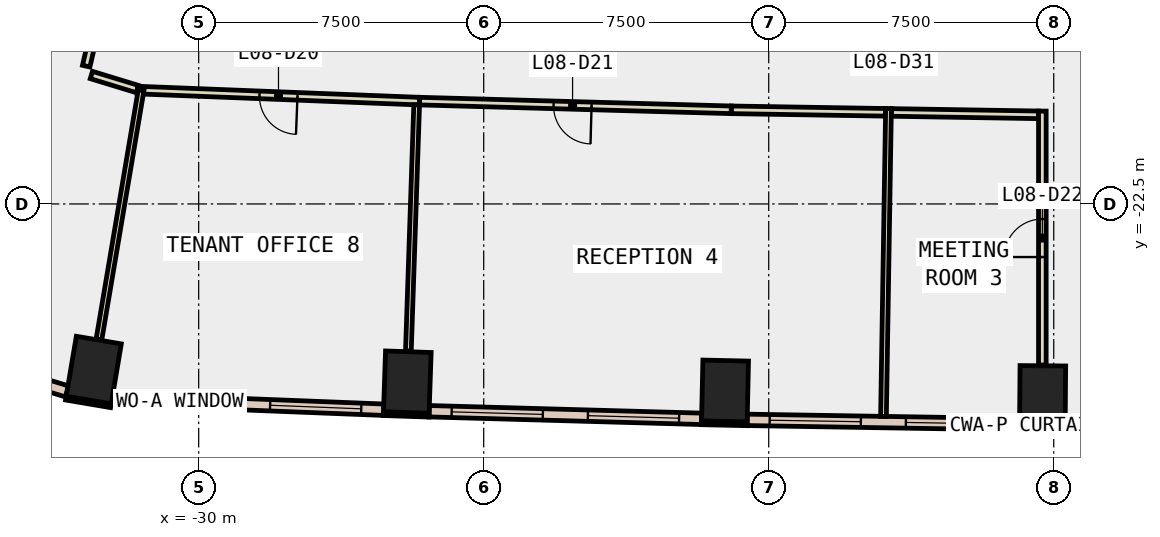
"""IFC4 building model, lengths in metres.
Left out: names, types, materials, properties, quantities, classifications, styles, units other than length and angle.
Written with IfcOpenShell. Run it as: python <this file> out.ifc"""

import sys

from ifc_helpers import new_model, si_unit, direction, frame, frame_2d, origin, origin_2d, place, context, subcontext, project, spatial, rectangle, extrude, element, fill, save


model = new_model("IFC4")
c1 = context("Model", 3, precision=1e-05, world=origin(), true_north=direction((0.0, 1.0)))
c2 = subcontext(c1, "Body", "Model", "MODEL_VIEW")
j1 = project(units=[si_unit("LENGTHUNIT", "METRE"), si_unit("PLANEANGLEUNIT", "RADIAN")], contexts=[c1])
p1 = place(None, origin())
s1 = spatial("IfcSite", under=j1, at=p1, CompositionType="ELEMENT")
p2 = place(p1, origin())
s2 = spatial("IfcBuilding", under=s1, at=p2, CompositionType="ELEMENT")
p3 = place(p2, frame((0.0, 0.0, 43.4)))
s3 = spatial("IfcBuildingStorey", under=s2, at=p3, CompositionType="ELEMENT", Elevation=43.4)
for number, where, z_axis, x_axis in (
    (1, (-32.761, -26.871, -0.4), (0.0, 0.0, 1.0), (-0.986, 0.167, 0.0)),
    (2, (-24.51, -27.188, -0.4), (0.0, 0.0, 1.0), (-0.999, 0.034, 0.0)),
    (3, (-16.15, -27.421, -0.4), (0.0, 0.0, 1.0), (-1.0, 0.022, 0.0)),
    (4, (-7.793, -27.558, -0.4), (0.0, 0.0, 1.0), (-1.0, 0.008, 0.0)),
):
    element("IfcColumn", number, at=place(p3, frame(where, z_axis=z_axis, x_axis=x_axis)), inside=s3, PredefinedType="COLUMN", context=c2, shape_type="SweptSolid", body=[
        extrude(rectangle(XDim=1.2, YDim=1.6, at=origin_2d()), origin(), (0.0, 0.0, 1.0), 4.2),
    ])
for number, where, z_axis, x_axis in (
    (5, (-33.494, -27.609, 0.0), (0.0, 0.0, 1.0), (0.986, -0.167, 0.0)),
    (6, (-25.138, -28.017, 0.0), (0.0, 0.0, 1.0), (0.999, -0.033, 0.0)),
):
    element("IfcWall", number, at=place(p3, frame(where, z_axis=z_axis, x_axis=x_axis)), inside=s3, PredefinedType="STANDARD", context=c2, shape_type="SweptSolid", body=[
        extrude(rectangle(XDim=1.2, YDim=0.1, at=frame_2d((0.6, 0.0))), origin(), (0.0, 0.0, 1.0), 3.8),
    ])
p4 = place(p3, frame((-16.769, -28.258, 0.0), z_axis=(0.0, 0.0, 1.0), x_axis=(0.99976752127, -0.021561618973, 0.0)))
e7 = element("IfcWall", 7, at=p4, inside=s3, PredefinedType="STANDARD", context=c2, shape_type="SweptSolid", body=[
    extrude(rectangle(XDim=1.2, YDim=0.1, at=frame_2d((0.6, 0.0))), origin(), (0.0, 0.0, 1.0), 3.8),
])
p5 = place(p3, frame((-8.4, -28.403, 0.0), z_axis=(0.0, 0.0, 1.0), x_axis=(0.999965208912, -0.008341520563, 0.0)))
e8 = element("IfcWall", 8, at=p5, inside=s3, PredefinedType="STANDARD", context=c2, shape_type="SweptSolid", body=[
    extrude(rectangle(XDim=1.2, YDim=0.1, at=frame_2d((0.6, 0.0))), origin(), (0.0, 0.0, 1.0), 3.8),
])
p6 = place(p3, frame((-32.282, -27.633, 0.0), z_axis=(0.0, 0.0, 1.0), x_axis=(0.999228146648, -0.039282450878, 0.0)))
e9 = element("IfcWall", 9, at=p6, inside=s3, PredefinedType="STANDARD", context=c2, shape_type="SweptSolid", body=[
    extrude(rectangle(XDim=7.154, YDim=0.3, at=frame_2d((3.577, 0.0))), origin(), (0.0, 0.0, 1.0), 3.8),
])
p7 = place(p6, frame((0.588, 0.0, 0.9)))
e10 = element("IfcOpeningElement", 10, at=p7, cuts=e9, PredefinedType="OPENING", context=c2, shape_type="SweptSolid", body=[
    extrude(rectangle(XDim=2.4, YDim=2.6, at=frame_2d((1.2, 1.3))), frame((0.0, 0.16, 0.0), z_axis=(0.0, -1.0, 0.0), x_axis=(1.0, 0.0, 0.0)), (0.0, 0.0, 1.0), 0.32),
])
p8 = place(p6, frame((4.165, 0.0, 0.9)))
e11 = element("IfcOpeningElement", 11, at=p8, cuts=e9, PredefinedType="OPENING", context=c2, shape_type="SweptSolid", body=[
    extrude(rectangle(XDim=2.4, YDim=2.6, at=frame_2d((1.2, 1.3))), frame((0.0, 0.16, 0.0), z_axis=(0.0, -1.0, 0.0), x_axis=(1.0, 0.0, 0.0)), (0.0, 0.0, 1.0), 0.32),
])
p9 = place(p3, frame((-23.936, -27.954, 0.0), z_axis=(0.0, 0.0, 1.0), x_axis=(0.999611502654, -0.02787191709, 0.0)))
e12 = element("IfcWall", 12, at=p9, inside=s3, PredefinedType="STANDARD", context=c2, shape_type="SweptSolid", body=[
    extrude(rectangle(XDim=7.174, YDim=0.3, at=frame_2d((3.587, 0.0))), origin(), (0.0, 0.0, 1.0), 3.8),
])
p10 = place(p9, frame((0.593, 0.0, 0.9)))
e13 = element("IfcOpeningElement", 13, at=p10, cuts=e12, PredefinedType="OPENING", context=c2, shape_type="SweptSolid", body=[
    extrude(rectangle(XDim=2.4, YDim=2.6, at=frame_2d((1.2, 1.3))), frame((0.0, 0.16, 0.0), z_axis=(0.0, -1.0, 0.0), x_axis=(1.0, 0.0, 0.0)), (0.0, 0.0, 1.0), 0.32),
])
p11 = place(p9, frame((4.18, 0.0, 0.9)))
e14 = element("IfcOpeningElement", 14, at=p11, cuts=e12, PredefinedType="OPENING", context=c2, shape_type="SweptSolid", body=[
    extrude(rectangle(XDim=2.4, YDim=2.6, at=frame_2d((1.2, 1.3))), frame((0.0, 0.16, 0.0), z_axis=(0.0, -1.0, 0.0), x_axis=(1.0, 0.0, 0.0)), (0.0, 0.0, 1.0), 0.32),
])
p12 = place(p3, frame((-15.568, -28.181, 0.0), z_axis=(0.0, 0.0, 1.0), x_axis=(0.999866467443, -0.016341581408, 0.0)))
e15 = element("IfcWall", 15, at=p12, inside=s3, PredefinedType="STANDARD", context=c2, shape_type="SweptSolid", body=[
    extrude(rectangle(XDim=7.171, YDim=0.3, at=frame_2d((3.585, 0.0))), origin(), (0.0, 0.0, 1.0), 3.8),
])
p13 = place(p12, frame((0.593, 0.0, 0.9)))
e16 = element("IfcOpeningElement", 16, at=p13, cuts=e15, PredefinedType="OPENING", context=c2, shape_type="SweptSolid", body=[
    extrude(rectangle(XDim=2.4, YDim=2.6, at=frame_2d((1.2, 1.3))), frame((0.0, 0.16, 0.0), z_axis=(0.0, -1.0, 0.0), x_axis=(1.0, 0.0, 0.0)), (0.0, 0.0, 1.0), 0.32),
])
p14 = place(p12, frame((4.178, 0.0, 0.9)))
e17 = element("IfcOpeningElement", 17, at=p14, cuts=e15, PredefinedType="OPENING", context=c2, shape_type="SweptSolid", body=[
    extrude(rectangle(XDim=2.4, YDim=2.6, at=frame_2d((1.2, 1.3))), frame((0.0, 0.16, 0.0), z_axis=(0.0, -1.0, 0.0), x_axis=(1.0, 0.0, 0.0)), (0.0, 0.0, 1.0), 0.32),
])
p15 = place(p3, frame((-36.507, -26.505, 0.0), z_axis=(0.0, 0.0, 1.0), x_axis=(0.95648967224, -0.291766185322, 0.0)))
e18 = element("IfcWall", 18, at=p15, inside=s3, PredefinedType="STANDARD", context=c2, shape_type="SweptSolid", body=[
    extrude(rectangle(XDim=3.181, YDim=0.3, at=frame_2d((1.591, 0.0))), origin(), (0.0, 0.0, 1.0), 3.8),
])
p16 = place(p15, frame((0.891, 0.0, 0.9)))
e19 = element("IfcOpeningElement", 19, at=p16, cuts=e18, PredefinedType="OPENING", context=c2, shape_type="SweptSolid", body=[
    extrude(rectangle(XDim=1.4, YDim=2.6, at=frame_2d((0.7, 1.3))), frame((0.0, 0.16, 0.0), z_axis=(0.0, -1.0, 0.0), x_axis=(1.0, 0.0, 0.0)), (0.0, 0.0, 1.0), 0.32),
])
p17 = place(p3, frame((-31.611, -19.477, 0.0), z_axis=(0.0, 0.0, 1.0), x_axis=(-0.956459113118, 0.291866347723, 0.0)))
e20 = element("IfcWall", 20, at=p17, inside=s3, PredefinedType="PARTITIONING", context=c2, shape_type="SweptSolid", body=[
    extrude(rectangle(XDim=1.268, YDim=0.2, at=frame_2d((0.634, 0.0))), origin(), (0.0, 0.0, 1.0), 3.8),
])
p18 = place(p3, frame((-32.96, -18.874, 0.0), z_axis=(0.0, 0.0, 1.0), x_axis=(0.226081445763, 0.974108402531, 0.0)))
e21 = element("IfcWall", 21, at=p18, inside=s3, PredefinedType="PARTITIONING", context=c2, shape_type="SweptSolid", body=[
    extrude(rectangle(XDim=1.371, YDim=0.2, at=frame_2d((0.686, 0.0))), origin(), (0.0, 0.0, 1.0), 3.8),
])
p19 = place(p3, frame((-24.186, -19.795, 0.0), z_axis=(0.0, 0.0, 1.0), x_axis=(-0.9992284676, 0.039274285953, 0.0)))
e22 = element("IfcWall", 22, at=p19, inside=s3, PredefinedType="PARTITIONING", context=c2, shape_type="SweptSolid", body=[
    extrude(rectangle(XDim=7.435, YDim=0.2, at=frame_2d((3.717, 0.0))), origin(), (0.0, 0.0, 1.0), 3.8),
])
p20 = place(p19, frame((3.217, 0.0, 0.0)))
e23 = element("IfcOpeningElement", 23, at=p20, cuts=e22, PredefinedType="OPENING", context=c2, shape_type="SweptSolid", body=[
    extrude(rectangle(XDim=1.0, YDim=2.1, at=frame_2d((0.5, 1.05))), frame((0.0, 0.11, 0.0), z_axis=(0.0, -1.0, 0.0), x_axis=(1.0, 0.0, 0.0)), (0.0, 0.0, 1.0), 0.22),
])
p21 = place(p3, frame((-11.924, -20.089, 0.0), z_axis=(0.0, 0.0, 1.0), x_axis=(-0.999867376665, 0.016285855216, 0.0)))
e24 = element("IfcWall", 24, at=p21, inside=s3, PredefinedType="PARTITIONING", context=c2, shape_type="SweptSolid", body=[
    extrude(rectangle(XDim=4.062, YDim=0.2, at=frame_2d((2.031, 0.0))), origin(), (0.0, 0.0, 1.0), 3.8),
])
p22 = place(p3, frame((-15.986, -20.023, 0.0), z_axis=(0.0, 0.0, 1.0), x_axis=(-0.999610256124, 0.027916587377, 0.0)))
e25 = element("IfcWall", 25, at=p22, inside=s3, PredefinedType="PARTITIONING", context=c2, shape_type="SweptSolid", body=[
    extrude(rectangle(XDim=8.203, YDim=0.2, at=frame_2d((4.102, 0.0))), origin(), (0.0, 0.0, 1.0), 3.8),
])
p23 = place(p22, frame((3.677, 0.0, 0.0)))
e26 = element("IfcOpeningElement", 26, at=p23, cuts=e25, PredefinedType="OPENING", context=c2, shape_type="SweptSolid", body=[
    extrude(rectangle(XDim=1.0, YDim=2.1, at=frame_2d((0.5, 1.05))), frame((0.0, 0.11, 0.0), z_axis=(0.0, -1.0, 0.0), x_axis=(1.0, 0.0, 0.0)), (0.0, 0.0, 1.0), 0.22),
])
p24 = place(p3, frame((-7.9, -20.155, 0.0), z_axis=(0.0, 0.0, 1.0), x_axis=(-0.999867846419, 0.016256989184, 0.0)))
e27 = element("IfcWall", 27, at=p24, inside=s3, PredefinedType="PARTITIONING", context=c2, shape_type="SweptSolid", body=[
    extrude(rectangle(XDim=3.875, YDim=0.2, at=frame_2d((1.937, 0.0))), origin(), (0.0, 0.0, 1.0), 3.8),
])
p25 = place(p3, frame((-7.8, -26.738, 0.0), z_axis=(0.0, 0.0, 1.0), x_axis=(0.0, 1.0, 0.0)))
e28 = element("IfcWall", 28, at=p25, inside=s3, PredefinedType="PARTITIONING", context=c2, shape_type="SweptSolid", body=[
    extrude(rectangle(XDim=6.681, YDim=0.2, at=frame_2d((3.341, 0.0))), origin(), (0.0, 0.0, 1.0), 3.8),
])
p26 = place(p25, frame((2.841, 0.0, 0.0)))
e29 = element("IfcOpeningElement", 29, at=p26, cuts=e28, PredefinedType="OPENING", context=c2, shape_type="SweptSolid", body=[
    extrude(rectangle(XDim=1.0, YDim=2.1, at=frame_2d((0.5, 1.05))), frame((0.0, 0.11, 0.0), z_axis=(0.0, -1.0, 0.0), x_axis=(1.0, 0.0, 0.0)), (0.0, 0.0, 1.0), 0.22),
])
p27 = place(p3, frame((-31.515, -19.506, 0.0), z_axis=(0.0, 0.0, 1.0), x_axis=(-0.166785823947, -0.985993148521, 0.0)))
e30 = element("IfcWall", 30, at=p27, inside=s3, PredefinedType="PARTITIONING", context=c2, shape_type="SweptSolid", body=[
    extrude(rectangle(XDim=6.65, YDim=0.15, at=frame_2d((3.325, 0.0))), origin(), (0.0, 0.0, 1.0), 3.8),
])
p28 = place(p3, frame((-24.264, -19.892, 0.0), z_axis=(0.0, 0.0, 1.0), x_axis=(-0.033647289587, -0.999433769643, 0.0)))
e31 = element("IfcWall", 31, at=p28, inside=s3, PredefinedType="PARTITIONING", context=c2, shape_type="SweptSolid", body=[
    extrude(rectangle(XDim=6.479, YDim=0.15, at=frame_2d((3.24, 0.0))), origin(), (0.0, 0.0, 1.0), 3.8),
])
p29 = place(p3, frame((-11.848, -19.991, 0.0), z_axis=(0.0, 0.0, 1.0), x_axis=(-0.016305783899, -0.999867051868, 0.0)))
e32 = element("IfcWall", 32, at=p29, inside=s3, PredefinedType="PARTITIONING", context=c2, shape_type="SweptSolid", body=[
    extrude(rectangle(XDim=8.1, YDim=0.15, at=frame_2d((4.05, 0.0))), origin(), (0.0, 0.0, 1.0), 3.8),
])
p30 = place(p7, origin())
e33 = element("IfcWindow", 33, at=p30, inside=s3, PartitioningType="SINGLE_PANEL", PredefinedType="WINDOW", context=c2, shape_type="SweptSolid", body=[
    extrude(rectangle(XDim=2.4, YDim=2.6, at=frame_2d((1.2, 1.3))), frame((0.0, 0.03, 0.0), z_axis=(0.0, -1.0, 0.0), x_axis=(1.0, 0.0, 0.0)), (0.0, 0.0, 1.0), 0.06),
])
fill(e10, e33)
p31 = place(p8, origin())
e34 = element("IfcWindow", 34, at=p31, inside=s3, PartitioningType="SINGLE_PANEL", PredefinedType="WINDOW", context=c2, shape_type="SweptSolid", body=[
    extrude(rectangle(XDim=2.4, YDim=2.6, at=frame_2d((1.2, 1.3))), frame((0.0, 0.03, 0.0), z_axis=(0.0, -1.0, 0.0), x_axis=(1.0, 0.0, 0.0)), (0.0, 0.0, 1.0), 0.06),
])
fill(e11, e34)
p32 = place(p10, origin())
e35 = element("IfcWindow", 35, at=p32, inside=s3, PartitioningType="SINGLE_PANEL", PredefinedType="WINDOW", context=c2, shape_type="SweptSolid", body=[
    extrude(rectangle(XDim=2.4, YDim=2.6, at=frame_2d((1.2, 1.3))), frame((0.0, 0.03, 0.0), z_axis=(0.0, -1.0, 0.0), x_axis=(1.0, 0.0, 0.0)), (0.0, 0.0, 1.0), 0.06),
])
fill(e13, e35)
p33 = place(p11, origin())
e36 = element("IfcWindow", 36, at=p33, inside=s3, PartitioningType="SINGLE_PANEL", PredefinedType="WINDOW", context=c2, shape_type="SweptSolid", body=[
    extrude(rectangle(XDim=2.4, YDim=2.6, at=frame_2d((1.2, 1.3))), frame((0.0, 0.03, 0.0), z_axis=(0.0, -1.0, 0.0), x_axis=(1.0, 0.0, 0.0)), (0.0, 0.0, 1.0), 0.06),
])
fill(e14, e36)
p34 = place(p13, origin())
e37 = element("IfcWindow", 37, at=p34, inside=s3, PartitioningType="SINGLE_PANEL", PredefinedType="WINDOW", context=c2, shape_type="SweptSolid", body=[
    extrude(rectangle(XDim=2.4, YDim=2.6, at=frame_2d((1.2, 1.3))), frame((0.0, 0.03, 0.0), z_axis=(0.0, -1.0, 0.0), x_axis=(1.0, 0.0, 0.0)), (0.0, 0.0, 1.0), 0.06),
])
fill(e16, e37)
p35 = place(p14, origin())
e38 = element("IfcWindow", 38, at=p35, inside=s3, PartitioningType="SINGLE_PANEL", PredefinedType="WINDOW", context=c2, shape_type="SweptSolid", body=[
    extrude(rectangle(XDim=2.4, YDim=2.6, at=frame_2d((1.2, 1.3))), frame((0.0, 0.03, 0.0), z_axis=(0.0, -1.0, 0.0), x_axis=(1.0, 0.0, 0.0)), (0.0, 0.0, 1.0), 0.06),
])
fill(e17, e38)
p36 = place(p20, origin())
e39 = element("IfcDoor", 39, at=p36, inside=s3, OperationType="SINGLE_SWING_LEFT", PredefinedType="DOOR", context=c2, shape_type="SweptSolid", body=[
    extrude(rectangle(XDim=1.0, YDim=2.1, at=frame_2d((0.5, 1.05))), frame((0.0, 0.025, 0.0), z_axis=(0.0, -1.0, 0.0), x_axis=(1.0, 0.0, 0.0)), (0.0, 0.0, 1.0), 0.05),
])
fill(e23, e39)
p37 = place(p23, origin())
e40 = element("IfcDoor", 40, at=p37, inside=s3, OperationType="SINGLE_SWING_RIGHT", PredefinedType="DOOR", context=c2, shape_type="SweptSolid", body=[
    extrude(rectangle(XDim=1.0, YDim=2.1, at=frame_2d((0.5, 1.05))), frame((0.0, 0.025, 0.0), z_axis=(0.0, -1.0, 0.0), x_axis=(1.0, 0.0, 0.0)), (0.0, 0.0, 1.0), 0.05),
])
fill(e26, e40)
p38 = place(p26, origin())
e41 = element("IfcDoor", 41, at=p38, inside=s3, OperationType="SINGLE_SWING_LEFT", PredefinedType="DOOR", context=c2, shape_type="SweptSolid", body=[
    extrude(rectangle(XDim=1.0, YDim=2.1, at=frame_2d((0.5, 1.05))), frame((0.0, 0.025, 0.0), z_axis=(0.0, -1.0, 0.0), x_axis=(1.0, 0.0, 0.0)), (0.0, 0.0, 1.0), 0.05),
])
fill(e29, e41)
save(model, sys.argv[1])
